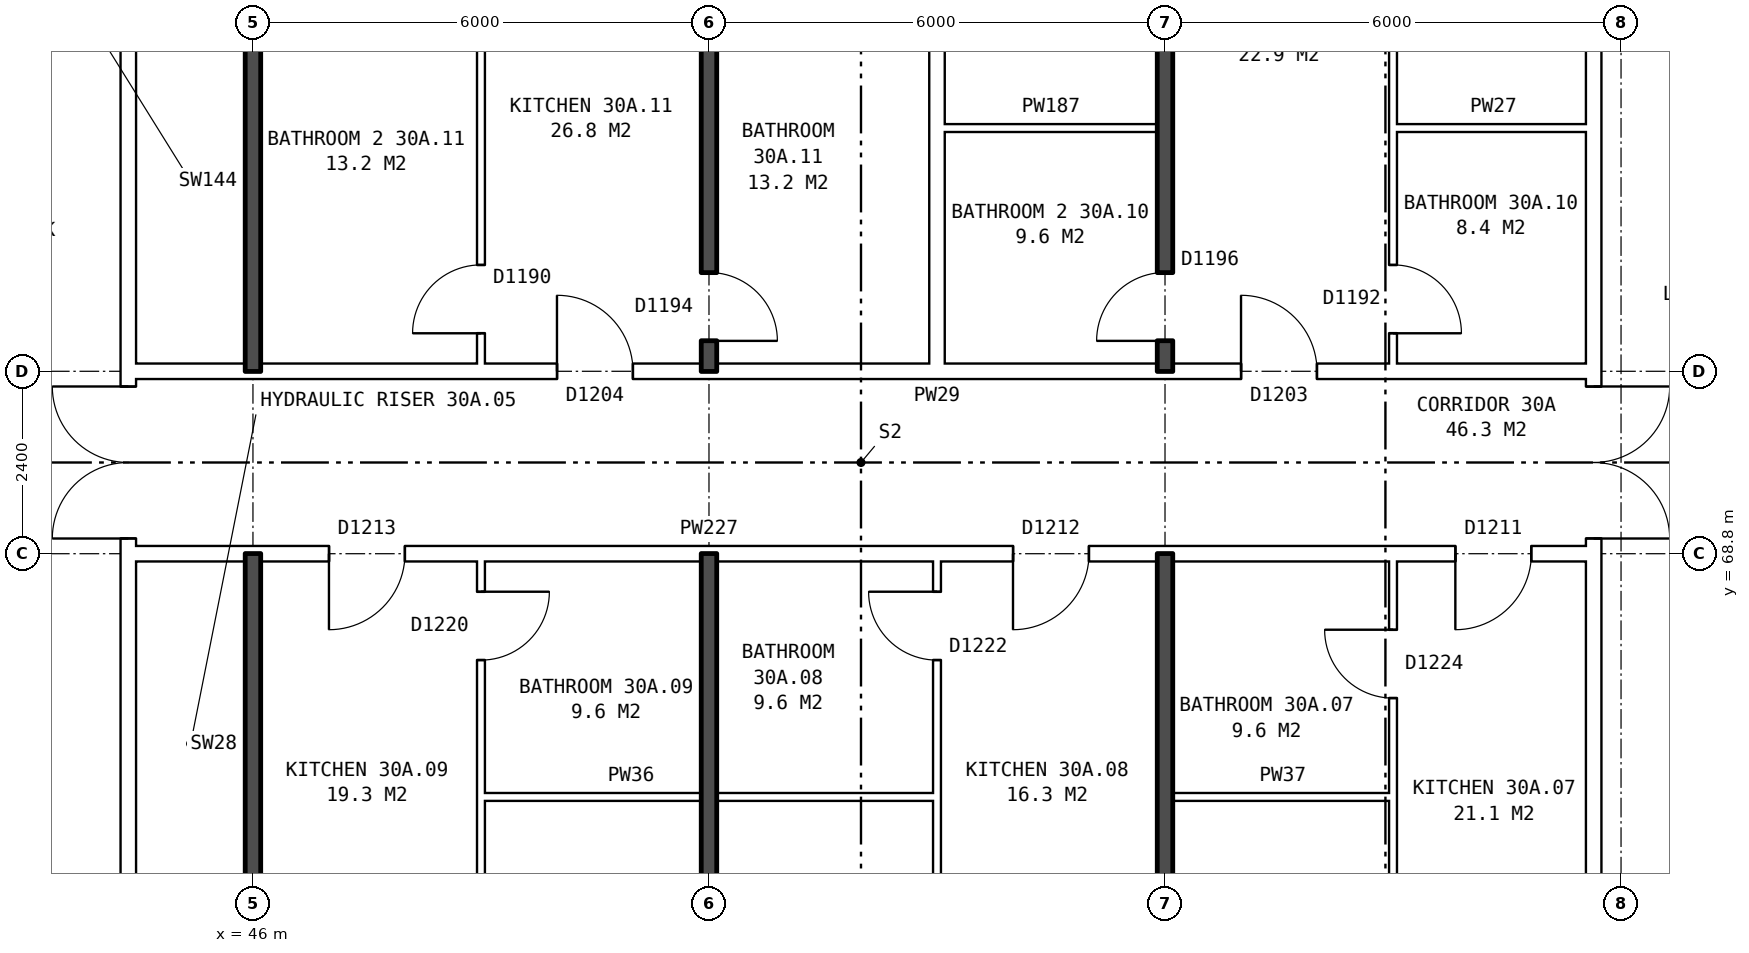
"""IFC4 building model, lengths in metres.
Left out: names, types, materials, properties, quantities, classifications, styles, units other than length and angle.
Written with IfcOpenShell. Run it as: python <this file> out.ifc"""

import sys

from ifc_helpers import new_model, si_unit, direction, frame, frame_2d, origin, place, context, subcontext, project, spatial, rectangle, extrude, element, fill, save


model = new_model("IFC4")
c1 = context("Model", 3, precision=1e-05, world=origin(), true_north=direction((0.0, 1.0)))
c2 = subcontext(c1, "Body", "Model", "MODEL_VIEW")
j1 = project(units=[si_unit("LENGTHUNIT", "METRE"), si_unit("PLANEANGLEUNIT", "RADIAN")], contexts=[c1])
p1 = place(None, origin())
s1 = spatial("IfcSite", under=j1, at=p1, CompositionType="ELEMENT")
p2 = place(p1, origin())
s2 = spatial("IfcBuilding", under=s1, at=p2, CompositionType="ELEMENT")
p3 = place(p2, frame((0.0, 0.0, 108.8)))
s3 = spatial("IfcBuildingStorey", under=s2, at=p3, CompositionType="ELEMENT", Elevation=108.8)
p4 = place(p3, frame((63.64, 63.9, 0.0), z_axis=(0.0, 0.0, 1.0), x_axis=(0.0, 1.0, 0.0)))
e1 = element("IfcWall", 1, at=p4, inside=s3, PredefinedType="PARTITIONING", context=c2, shape_type="SweptSolid", body=[
    extrude(rectangle(XDim=12.2, YDim=0.2, at=frame_2d((6.1, 0.0))), origin(), (0.0, 0.0, 1.0), 2.85),
])
p5 = place(p4, frame((5.1, 0.0, 0.0)))
e2 = element("IfcOpeningElement", 2, at=p5, cuts=e1, PredefinedType="OPENING", context=c2, shape_type="SweptSolid", body=[
    extrude(rectangle(XDim=2.0, YDim=2.1, at=frame_2d((1.0, 1.05))), frame((0.0, 0.11, 0.0), z_axis=(0.0, -1.0, 0.0), x_axis=(1.0, 0.0, 0.0)), (0.0, 0.0, 1.0), 0.22),
])
p6 = place(p3, frame((44.36, 63.9, 0.0), z_axis=(0.0, 0.0, 1.0), x_axis=(0.0, 1.0, 0.0)))
e3 = element("IfcWall", 3, at=p6, inside=s3, PredefinedType="PARTITIONING", context=c2, shape_type="SweptSolid", body=[
    extrude(rectangle(XDim=12.2, YDim=0.2, at=frame_2d((6.1, 0.0))), origin(), (0.0, 0.0, 1.0), 2.85),
])
p7 = place(p6, frame((5.1, 0.0, 0.0)))
e4 = element("IfcOpeningElement", 4, at=p7, cuts=e3, PredefinedType="OPENING", context=c2, shape_type="SweptSolid", body=[
    extrude(rectangle(XDim=2.0, YDim=2.1, at=frame_2d((1.0, 1.05))), frame((0.0, 0.11, 0.0), z_axis=(0.0, -1.0, 0.0), x_axis=(1.0, 0.0, 0.0)), (0.0, 0.0, 1.0), 0.22),
])
p8 = place(p3, frame((49.0, 65.6, 0.0), z_axis=(0.0, 0.0, 1.0), x_axis=(1.0, 0.0, 0.0)))
e5 = element("IfcWall", 5, at=p8, inside=s3, PredefinedType="PARTITIONING", context=c2, shape_type="SweptSolid", body=[
    extrude(rectangle(XDim=6.0, YDim=0.1, at=frame_2d((3.0, 0.0))), origin(), (0.0, 0.0, 1.0), 2.85),
])
p9 = place(p3, frame((58.1, 65.6, 0.0), z_axis=(0.0, 0.0, 1.0), x_axis=(1.0, 0.0, 0.0)))
e6 = element("IfcWall", 6, at=p9, inside=s3, PredefinedType="PARTITIONING", context=c2, shape_type="SweptSolid", body=[
    extrude(rectangle(XDim=2.9, YDim=0.1, at=frame_2d((1.45, 0.0))), origin(), (0.0, 0.0, 1.0), 2.85),
])
p10 = place(p3, frame((44.36, 68.8, 0.0), z_axis=(0.0, 0.0, 1.0), x_axis=(1.0, 0.0, 0.0)))
e7 = element("IfcWall", 7, at=p10, inside=s3, PredefinedType="PARTITIONING", context=c2, shape_type="SweptSolid", body=[
    extrude(rectangle(XDim=19.28, YDim=0.2, at=frame_2d((9.64, 0.0))), origin(), (0.0, 0.0, 1.0), 2.85),
])
p11 = place(p10, frame((17.46, 0.0, 0.0)))
e8 = element("IfcOpeningElement", 8, at=p11, cuts=e7, PredefinedType="OPENING", context=c2, shape_type="SweptSolid", body=[
    extrude(rectangle(XDim=1.0, YDim=2.1, at=frame_2d((0.5, 1.05))), frame((0.0, 0.11, 0.0), z_axis=(0.0, -1.0, 0.0), x_axis=(1.0, 0.0, 0.0)), (0.0, 0.0, 1.0), 0.22),
])
p12 = place(p10, frame((11.64, 0.0, 0.0)))
e9 = element("IfcOpeningElement", 9, at=p12, cuts=e7, PredefinedType="OPENING", context=c2, shape_type="SweptSolid", body=[
    extrude(rectangle(XDim=1.0, YDim=2.1, at=frame_2d((0.5, 1.05))), frame((0.0, 0.11, 0.0), z_axis=(0.0, -1.0, 0.0), x_axis=(1.0, 0.0, 0.0)), (0.0, 0.0, 1.0), 0.22),
])
p13 = place(p10, frame((2.64, 0.0, 0.0)))
e10 = element("IfcOpeningElement", 10, at=p13, cuts=e7, PredefinedType="OPENING", context=c2, shape_type="SweptSolid", body=[
    extrude(rectangle(XDim=1.0, YDim=2.1, at=frame_2d((0.5, 1.05))), frame((0.0, 0.11, 0.0), z_axis=(0.0, -1.0, 0.0), x_axis=(1.0, 0.0, 0.0)), (0.0, 0.0, 1.0), 0.22),
])
p14 = place(p3, frame((44.36, 71.2, 0.0), z_axis=(0.0, 0.0, 1.0), x_axis=(1.0, 0.0, 0.0)))
e11 = element("IfcWall", 11, at=p14, inside=s3, PredefinedType="PARTITIONING", context=c2, shape_type="SweptSolid", body=[
    extrude(rectangle(XDim=19.28, YDim=0.2, at=frame_2d((9.64, 0.0))), origin(), (0.0, 0.0, 1.0), 2.85),
])
p15 = place(p14, frame((14.64, 0.0, 0.0)))
e12 = element("IfcOpeningElement", 12, at=p15, cuts=e11, PredefinedType="OPENING", context=c2, shape_type="SweptSolid", body=[
    extrude(rectangle(XDim=1.0, YDim=2.1, at=frame_2d((0.5, 1.05))), frame((0.0, 0.11, 0.0), z_axis=(0.0, -1.0, 0.0), x_axis=(1.0, 0.0, 0.0)), (0.0, 0.0, 1.0), 0.22),
])
p16 = place(p14, frame((5.64, 0.0, 0.0)))
e13 = element("IfcOpeningElement", 13, at=p16, cuts=e11, PredefinedType="OPENING", context=c2, shape_type="SweptSolid", body=[
    extrude(rectangle(XDim=1.0, YDim=2.1, at=frame_2d((0.5, 1.05))), frame((0.0, 0.11, 0.0), z_axis=(0.0, -1.0, 0.0), x_axis=(1.0, 0.0, 0.0)), (0.0, 0.0, 1.0), 0.22),
])
p17 = place(p3, frame((55.1, 74.4, 0.0), z_axis=(0.0, 0.0, 1.0), x_axis=(1.0, 0.0, 0.0)))
e14 = element("IfcWall", 14, at=p17, inside=s3, PredefinedType="PARTITIONING", context=c2, shape_type="SweptSolid", body=[
    extrude(rectangle(XDim=2.8, YDim=0.1, at=frame_2d((1.4, 0.0))), origin(), (0.0, 0.0, 1.0), 2.85),
])
p18 = place(p3, frame((61.0, 74.4, 0.0), z_axis=(0.0, 0.0, 1.0), x_axis=(1.0, 0.0, 0.0)))
e15 = element("IfcWall", 15, at=p18, inside=s3, PredefinedType="PARTITIONING", context=c2, shape_type="SweptSolid", body=[
    extrude(rectangle(XDim=2.64, YDim=0.1, at=frame_2d((1.32, 0.0))), origin(), (0.0, 0.0, 1.0), 2.85),
])
for number, where, z_axis, x_axis in (
    (16, (46.0, 63.8, 0.0), (0.0, 0.0, 1.0), (0.0, 1.0, 0.0)),
    (17, (46.0, 71.2, 0.0), (0.0, 0.0, 1.0), (0.0, 1.0, 0.0)),
):
    element("IfcWall", number, at=place(p3, frame(where, z_axis=z_axis, x_axis=x_axis)), inside=s3, PredefinedType="SOLIDWALL", context=c2, shape_type="SweptSolid", body=[
        extrude(rectangle(XDim=5.0, YDim=0.2, at=frame_2d((2.5, 0.0))), origin(), (0.0, 0.0, 1.0), 2.85),
    ])
p19 = place(p3, frame((49.0, 54.36, 0.0), z_axis=(0.0, 0.0, 1.0), x_axis=(0.0, 1.0, 0.0)))
e18 = element("IfcWall", 18, at=p19, inside=s3, PredefinedType="PARTITIONING", context=c2, shape_type="SweptSolid", body=[
    extrude(rectangle(XDim=14.34, YDim=0.1, at=frame_2d((7.17, 0.0))), origin(), (0.0, 0.0, 1.0), 2.85),
])
p20 = place(p19, frame((6.7, 0.0, 0.0)))
e19 = element("IfcOpeningElement", 19, at=p20, cuts=e18, PredefinedType="OPENING", context=c2, shape_type="SweptSolid", body=[
    extrude(rectangle(XDim=0.9, YDim=2.1, at=frame_2d((0.45, 1.05))), frame((0.0, 0.06, 0.0), z_axis=(0.0, -1.0, 0.0), x_axis=(1.0, 0.0, 0.0)), (0.0, 0.0, 1.0), 0.12),
])
p21 = place(p19, frame((13.04, 0.0, 0.0)))
e20 = element("IfcOpeningElement", 20, at=p21, cuts=e18, PredefinedType="OPENING", context=c2, shape_type="SweptSolid", body=[
    extrude(rectangle(XDim=0.9, YDim=2.1, at=frame_2d((0.45, 1.05))), frame((0.0, 0.06, 0.0), z_axis=(0.0, -1.0, 0.0), x_axis=(1.0, 0.0, 0.0)), (0.0, 0.0, 1.0), 0.12),
])
p22 = place(p3, frame((49.0, 71.3, 0.0), z_axis=(0.0, 0.0, 1.0), x_axis=(0.0, 1.0, 0.0)))
e21 = element("IfcWall", 21, at=p22, inside=s3, PredefinedType="PARTITIONING", context=c2, shape_type="SweptSolid", body=[
    extrude(rectangle(XDim=14.34, YDim=0.1, at=frame_2d((7.17, 0.0))), origin(), (0.0, 0.0, 1.0), 2.85),
])
p23 = place(p22, frame((9.24, 0.0, 0.0)))
e22 = element("IfcOpeningElement", 22, at=p23, cuts=e21, PredefinedType="OPENING", context=c2, shape_type="SweptSolid", body=[
    extrude(rectangle(XDim=0.9, YDim=2.1, at=frame_2d((0.45, 1.05))), frame((0.0, 0.06, 0.0), z_axis=(0.0, -1.0, 0.0), x_axis=(1.0, 0.0, 0.0)), (0.0, 0.0, 1.0), 0.12),
])
p24 = place(p22, frame((0.4, 0.0, 0.0)))
e23 = element("IfcOpeningElement", 23, at=p24, cuts=e21, PredefinedType="OPENING", context=c2, shape_type="SweptSolid", body=[
    extrude(rectangle(XDim=0.9, YDim=2.1, at=frame_2d((0.45, 1.05))), frame((0.0, 0.06, 0.0), z_axis=(0.0, -1.0, 0.0), x_axis=(1.0, 0.0, 0.0)), (0.0, 0.0, 1.0), 0.12),
])
p25 = place(p3, frame((52.0, 54.36, 0.0), z_axis=(0.0, 0.0, 1.0), x_axis=(0.0, 1.0, 0.0)))
e24 = element("IfcWall", 24, at=p25, inside=s3, PredefinedType="SOLIDWALL", context=c2, shape_type="SweptSolid", body=[
    extrude(rectangle(XDim=14.44, YDim=0.2, at=frame_2d((7.22, 0.0))), origin(), (0.0, 0.0, 1.0), 2.85),
])
p26 = place(p3, frame((52.0, 71.2, 0.0), z_axis=(0.0, 0.0, 1.0), x_axis=(0.0, 1.0, 0.0)))
e25 = element("IfcWall", 25, at=p26, inside=s3, PredefinedType="SOLIDWALL", context=c2, shape_type="SweptSolid", body=[
    extrude(rectangle(XDim=14.44, YDim=0.2, at=frame_2d((7.22, 0.0))), origin(), (0.0, 0.0, 1.0), 2.85),
])
p27 = place(p26, frame((9.34, 0.0, 0.0)))
e26 = element("IfcOpeningElement", 26, at=p27, cuts=e25, PredefinedType="OPENING", context=c2, shape_type="SweptSolid", body=[
    extrude(rectangle(XDim=0.9, YDim=2.1, at=frame_2d((0.45, 1.05))), frame((0.0, 0.11, 0.0), z_axis=(0.0, -1.0, 0.0), x_axis=(1.0, 0.0, 0.0)), (0.0, 0.0, 1.0), 0.22),
])
p28 = place(p26, frame((0.4, 0.0, 0.0)))
e27 = element("IfcOpeningElement", 27, at=p28, cuts=e25, PredefinedType="OPENING", context=c2, shape_type="SweptSolid", body=[
    extrude(rectangle(XDim=0.9, YDim=2.1, at=frame_2d((0.45, 1.05))), frame((0.0, 0.11, 0.0), z_axis=(0.0, -1.0, 0.0), x_axis=(1.0, 0.0, 0.0)), (0.0, 0.0, 1.0), 0.22),
])
p29 = place(p3, frame((55.0, 54.36, 0.0), z_axis=(0.0, 0.0, 1.0), x_axis=(0.0, 1.0, 0.0)))
e28 = element("IfcWall", 28, at=p29, inside=s3, PredefinedType="PARTITIONING", context=c2, shape_type="SweptSolid", body=[
    extrude(rectangle(XDim=14.34, YDim=0.1, at=frame_2d((7.17, 0.0))), origin(), (0.0, 0.0, 1.0), 2.85),
])
p30 = place(p29, frame((7.7, 0.0, 0.0)))
e29 = element("IfcOpeningElement", 29, at=p30, cuts=e28, PredefinedType="OPENING", context=c2, shape_type="SweptSolid", body=[
    extrude(rectangle(XDim=0.9, YDim=2.1, at=frame_2d((0.45, 1.05))), frame((0.0, 0.06, 0.0), z_axis=(0.0, -1.0, 0.0), x_axis=(1.0, 0.0, 0.0)), (0.0, 0.0, 1.0), 0.12),
])
p31 = place(p29, frame((13.04, 0.0, 0.0)))
e30 = element("IfcOpeningElement", 30, at=p31, cuts=e28, PredefinedType="OPENING", context=c2, shape_type="SweptSolid", body=[
    extrude(rectangle(XDim=0.9, YDim=2.1, at=frame_2d((0.45, 1.05))), frame((0.0, 0.06, 0.0), z_axis=(0.0, -1.0, 0.0), x_axis=(1.0, 0.0, 0.0)), (0.0, 0.0, 1.0), 0.12),
])
p32 = place(p3, frame((55.0, 71.3, 0.0), z_axis=(0.0, 0.0, 1.0), x_axis=(0.0, 1.0, 0.0)))
e31 = element("IfcWall", 31, at=p32, inside=s3, PredefinedType="PARTITIONING", context=c2, shape_type="SweptSolid", body=[
    extrude(rectangle(XDim=14.34, YDim=0.2, at=frame_2d((7.17, 0.0))), origin(), (0.0, 0.0, 1.0), 2.85),
])
p33 = place(p3, frame((58.0, 54.36, 0.0), z_axis=(0.0, 0.0, 1.0), x_axis=(0.0, 1.0, 0.0)))
e32 = element("IfcWall", 32, at=p33, inside=s3, PredefinedType="SOLIDWALL", context=c2, shape_type="SweptSolid", body=[
    extrude(rectangle(XDim=14.44, YDim=0.2, at=frame_2d((7.22, 0.0))), origin(), (0.0, 0.0, 1.0), 2.85),
])
p34 = place(p3, frame((58.0, 71.2, 0.0), z_axis=(0.0, 0.0, 1.0), x_axis=(0.0, 1.0, 0.0)))
e33 = element("IfcWall", 33, at=p34, inside=s3, PredefinedType="SOLIDWALL", context=c2, shape_type="SweptSolid", body=[
    extrude(rectangle(XDim=14.44, YDim=0.2, at=frame_2d((7.22, 0.0))), origin(), (0.0, 0.0, 1.0), 2.85),
])
p35 = place(p34, frame((8.04, 0.0, 0.0)))
e34 = element("IfcOpeningElement", 34, at=p35, cuts=e33, PredefinedType="OPENING", context=c2, shape_type="SweptSolid", body=[
    extrude(rectangle(XDim=0.9, YDim=2.1, at=frame_2d((0.45, 1.05))), frame((0.0, 0.11, 0.0), z_axis=(0.0, -1.0, 0.0), x_axis=(1.0, 0.0, 0.0)), (0.0, 0.0, 1.0), 0.22),
])
p36 = place(p34, frame((0.4, 0.0, 0.0)))
e35 = element("IfcOpeningElement", 35, at=p36, cuts=e33, PredefinedType="OPENING", context=c2, shape_type="SweptSolid", body=[
    extrude(rectangle(XDim=0.9, YDim=2.1, at=frame_2d((0.45, 1.05))), frame((0.0, 0.11, 0.0), z_axis=(0.0, -1.0, 0.0), x_axis=(1.0, 0.0, 0.0)), (0.0, 0.0, 1.0), 0.22),
])
p37 = place(p3, frame((61.0, 54.36, 0.0), z_axis=(0.0, 0.0, 1.0), x_axis=(0.0, 1.0, 0.0)))
e36 = element("IfcWall", 36, at=p37, inside=s3, PredefinedType="PARTITIONING", context=c2, shape_type="SweptSolid", body=[
    extrude(rectangle(XDim=14.34, YDim=0.1, at=frame_2d((7.17, 0.0))), origin(), (0.0, 0.0, 1.0), 2.85),
])
p38 = place(p37, frame((5.5, 0.0, 0.0)))
e37 = element("IfcOpeningElement", 37, at=p38, cuts=e36, PredefinedType="OPENING", context=c2, shape_type="SweptSolid", body=[
    extrude(rectangle(XDim=0.9, YDim=2.1, at=frame_2d((0.45, 1.05))), frame((0.0, 0.06, 0.0), z_axis=(0.0, -1.0, 0.0), x_axis=(1.0, 0.0, 0.0)), (0.0, 0.0, 1.0), 0.12),
])
p39 = place(p37, frame((12.54, 0.0, 0.0)))
e38 = element("IfcOpeningElement", 38, at=p39, cuts=e36, PredefinedType="OPENING", context=c2, shape_type="SweptSolid", body=[
    extrude(rectangle(XDim=0.9, YDim=2.1, at=frame_2d((0.45, 1.05))), frame((0.0, 0.06, 0.0), z_axis=(0.0, -1.0, 0.0), x_axis=(1.0, 0.0, 0.0)), (0.0, 0.0, 1.0), 0.12),
])
p40 = place(p3, frame((61.0, 71.3, 0.0), z_axis=(0.0, 0.0, 1.0), x_axis=(0.0, 1.0, 0.0)))
e39 = element("IfcWall", 39, at=p40, inside=s3, PredefinedType="PARTITIONING", context=c2, shape_type="SweptSolid", body=[
    extrude(rectangle(XDim=14.34, YDim=0.1, at=frame_2d((7.17, 0.0))), origin(), (0.0, 0.0, 1.0), 2.85),
])
p41 = place(p40, frame((7.94, 0.0, 0.0)))
e40 = element("IfcOpeningElement", 40, at=p41, cuts=e39, PredefinedType="OPENING", context=c2, shape_type="SweptSolid", body=[
    extrude(rectangle(XDim=0.9, YDim=2.1, at=frame_2d((0.45, 1.05))), frame((0.0, 0.06, 0.0), z_axis=(0.0, -1.0, 0.0), x_axis=(1.0, 0.0, 0.0)), (0.0, 0.0, 1.0), 0.12),
])
p42 = place(p40, frame((0.4, 0.0, 0.0)))
e41 = element("IfcOpeningElement", 41, at=p42, cuts=e39, PredefinedType="OPENING", context=c2, shape_type="SweptSolid", body=[
    extrude(rectangle(XDim=0.9, YDim=2.1, at=frame_2d((0.45, 1.05))), frame((0.0, 0.06, 0.0), z_axis=(0.0, -1.0, 0.0), x_axis=(1.0, 0.0, 0.0)), (0.0, 0.0, 1.0), 0.12),
])
p43 = place(p5, frame((2.0, 0.0, 0.0), z_axis=(0.0, 0.0, 1.0), x_axis=(-1.0, 0.0, 0.0)))
e42 = element("IfcDoor", 42, at=p43, inside=s3, OperationType="DOUBLE_DOOR_SINGLE_SWING", PredefinedType="DOOR", context=c2, shape_type="SweptSolid", body=[
    extrude(rectangle(XDim=2.0, YDim=2.1, at=frame_2d((1.0, 1.05))), frame((0.0, 0.025, 0.0), z_axis=(0.0, -1.0, 0.0), x_axis=(1.0, 0.0, 0.0)), (0.0, 0.0, 1.0), 0.05),
])
fill(e2, e42)
p44 = place(p7, origin())
e43 = element("IfcDoor", 43, at=p44, inside=s3, OperationType="DOUBLE_DOOR_SINGLE_SWING", PredefinedType="DOOR", context=c2, shape_type="SweptSolid", body=[
    extrude(rectangle(XDim=2.0, YDim=2.1, at=frame_2d((1.0, 1.05))), frame((0.0, 0.025, 0.0), z_axis=(0.0, -1.0, 0.0), x_axis=(1.0, 0.0, 0.0)), (0.0, 0.0, 1.0), 0.05),
])
fill(e4, e43)
p45 = place(p11, frame((1.0, 0.0, 0.0), z_axis=(0.0, 0.0, 1.0), x_axis=(-1.0, 0.0, 0.0)))
e44 = element("IfcDoor", 44, at=p45, inside=s3, OperationType="SINGLE_SWING_RIGHT", PredefinedType="DOOR", context=c2, shape_type="SweptSolid", body=[
    extrude(rectangle(XDim=1.0, YDim=2.1, at=frame_2d((0.5, 1.05))), frame((0.0, 0.025, 0.0), z_axis=(0.0, -1.0, 0.0), x_axis=(1.0, 0.0, 0.0)), (0.0, 0.0, 1.0), 0.05),
])
fill(e8, e44)
p46 = place(p39, origin())
e45 = element("IfcDoor", 45, at=p46, inside=s3, OperationType="SINGLE_SWING_RIGHT", PredefinedType="DOOR", context=c2, shape_type="SweptSolid", body=[
    extrude(rectangle(XDim=0.9, YDim=2.1, at=frame_2d((0.45, 1.05))), frame((0.0, 0.025, 0.0), z_axis=(0.0, -1.0, 0.0), x_axis=(1.0, 0.0, 0.0)), (0.0, 0.0, 1.0), 0.05),
])
fill(e38, e45)
p47 = place(p12, frame((1.0, 0.0, 0.0), z_axis=(0.0, 0.0, 1.0), x_axis=(-1.0, 0.0, 0.0)))
e46 = element("IfcDoor", 46, at=p47, inside=s3, OperationType="SINGLE_SWING_RIGHT", PredefinedType="DOOR", context=c2, shape_type="SweptSolid", body=[
    extrude(rectangle(XDim=1.0, YDim=2.1, at=frame_2d((0.5, 1.05))), frame((0.0, 0.025, 0.0), z_axis=(0.0, -1.0, 0.0), x_axis=(1.0, 0.0, 0.0)), (0.0, 0.0, 1.0), 0.05),
])
fill(e9, e46)
p48 = place(p31, origin())
e47 = element("IfcDoor", 47, at=p48, inside=s3, OperationType="SINGLE_SWING_RIGHT", PredefinedType="DOOR", context=c2, shape_type="SweptSolid", body=[
    extrude(rectangle(XDim=0.9, YDim=2.1, at=frame_2d((0.45, 1.05))), frame((0.0, 0.025, 0.0), z_axis=(0.0, -1.0, 0.0), x_axis=(1.0, 0.0, 0.0)), (0.0, 0.0, 1.0), 0.05),
])
fill(e30, e47)
p49 = place(p13, frame((1.0, 0.0, 0.0), z_axis=(0.0, 0.0, 1.0), x_axis=(-1.0, 0.0, 0.0)))
e48 = element("IfcDoor", 48, at=p49, inside=s3, OperationType="SINGLE_SWING_RIGHT", PredefinedType="DOOR", context=c2, shape_type="SweptSolid", body=[
    extrude(rectangle(XDim=1.0, YDim=2.1, at=frame_2d((0.5, 1.05))), frame((0.0, 0.025, 0.0), z_axis=(0.0, -1.0, 0.0), x_axis=(1.0, 0.0, 0.0)), (0.0, 0.0, 1.0), 0.05),
])
fill(e10, e48)
p50 = place(p21, frame((0.9, 0.0, 0.0), z_axis=(0.0, 0.0, 1.0), x_axis=(-1.0, 0.0, 0.0)))
e49 = element("IfcDoor", 49, at=p50, inside=s3, OperationType="SINGLE_SWING_LEFT", PredefinedType="DOOR", context=c2, shape_type="SweptSolid", body=[
    extrude(rectangle(XDim=0.9, YDim=2.1, at=frame_2d((0.45, 1.05))), frame((0.0, 0.025, 0.0), z_axis=(0.0, -1.0, 0.0), x_axis=(1.0, 0.0, 0.0)), (0.0, 0.0, 1.0), 0.05),
])
fill(e20, e49)
p51 = place(p15, origin())
e50 = element("IfcDoor", 50, at=p51, inside=s3, OperationType="SINGLE_SWING_LEFT", PredefinedType="DOOR", context=c2, shape_type="SweptSolid", body=[
    extrude(rectangle(XDim=1.0, YDim=2.1, at=frame_2d((0.5, 1.05))), frame((0.0, 0.025, 0.0), z_axis=(0.0, -1.0, 0.0), x_axis=(1.0, 0.0, 0.0)), (0.0, 0.0, 1.0), 0.05),
])
fill(e12, e50)
p52 = place(p42, frame((0.9, 0.0, 0.0), z_axis=(0.0, 0.0, 1.0), x_axis=(-1.0, 0.0, 0.0)))
e51 = element("IfcDoor", 51, at=p52, inside=s3, OperationType="SINGLE_SWING_RIGHT", PredefinedType="DOOR", context=c2, shape_type="SweptSolid", body=[
    extrude(rectangle(XDim=0.9, YDim=2.1, at=frame_2d((0.45, 1.05))), frame((0.0, 0.025, 0.0), z_axis=(0.0, -1.0, 0.0), x_axis=(1.0, 0.0, 0.0)), (0.0, 0.0, 1.0), 0.05),
])
fill(e41, e51)
p53 = place(p36, origin())
e52 = element("IfcDoor", 52, at=p53, inside=s3, OperationType="SINGLE_SWING_LEFT", PredefinedType="DOOR", context=c2, shape_type="SweptSolid", body=[
    extrude(rectangle(XDim=0.9, YDim=2.1, at=frame_2d((0.45, 1.05))), frame((0.0, 0.025, 0.0), z_axis=(0.0, -1.0, 0.0), x_axis=(1.0, 0.0, 0.0)), (0.0, 0.0, 1.0), 0.05),
])
fill(e35, e52)
p54 = place(p16, origin())
e53 = element("IfcDoor", 53, at=p54, inside=s3, OperationType="SINGLE_SWING_LEFT", PredefinedType="DOOR", context=c2, shape_type="SweptSolid", body=[
    extrude(rectangle(XDim=1.0, YDim=2.1, at=frame_2d((0.5, 1.05))), frame((0.0, 0.025, 0.0), z_axis=(0.0, -1.0, 0.0), x_axis=(1.0, 0.0, 0.0)), (0.0, 0.0, 1.0), 0.05),
])
fill(e13, e53)
p55 = place(p28, frame((0.9, 0.0, 0.0), z_axis=(0.0, 0.0, 1.0), x_axis=(-1.0, 0.0, 0.0)))
e54 = element("IfcDoor", 54, at=p55, inside=s3, OperationType="SINGLE_SWING_RIGHT", PredefinedType="DOOR", context=c2, shape_type="SweptSolid", body=[
    extrude(rectangle(XDim=0.9, YDim=2.1, at=frame_2d((0.45, 1.05))), frame((0.0, 0.025, 0.0), z_axis=(0.0, -1.0, 0.0), x_axis=(1.0, 0.0, 0.0)), (0.0, 0.0, 1.0), 0.05),
])
fill(e27, e54)
p56 = place(p24, origin())
e55 = element("IfcDoor", 55, at=p56, inside=s3, OperationType="SINGLE_SWING_LEFT", PredefinedType="DOOR", context=c2, shape_type="SweptSolid", body=[
    extrude(rectangle(XDim=0.9, YDim=2.1, at=frame_2d((0.45, 1.05))), frame((0.0, 0.025, 0.0), z_axis=(0.0, -1.0, 0.0), x_axis=(1.0, 0.0, 0.0)), (0.0, 0.0, 1.0), 0.05),
])
fill(e23, e55)
save(model, sys.argv[1])
